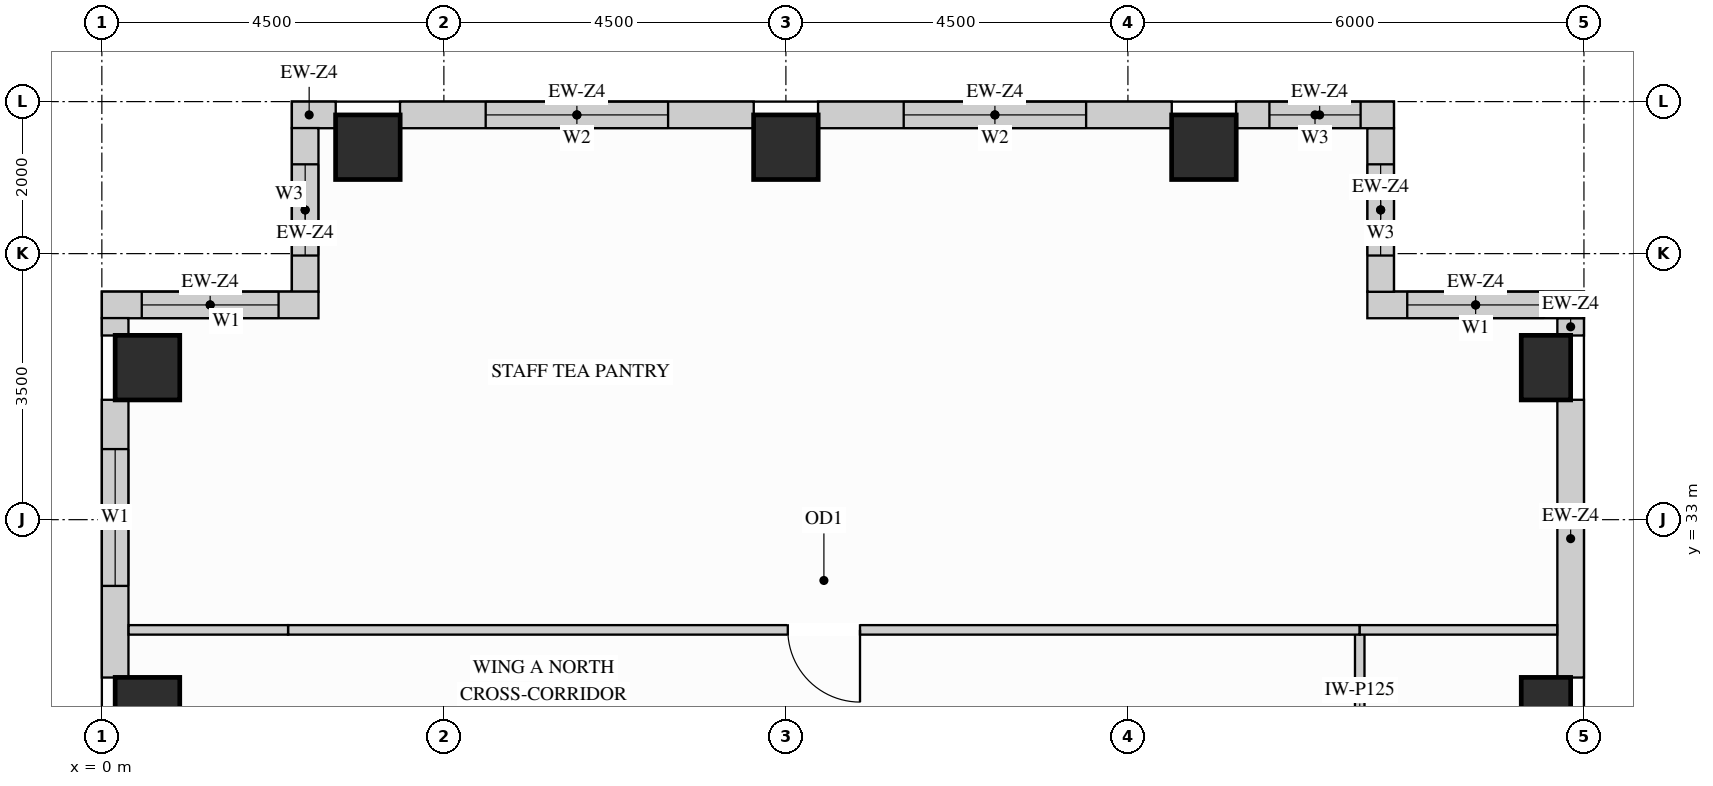
"""IFC4 building model, lengths in metres.
Left out: names, types, materials, properties, quantities, classifications, styles, units other than length and angle.
Written with IfcOpenShell. Run it as: python <this file> out.ifc"""

import sys

from ifc_helpers import new_model, si_unit, direction, frame, frame_2d, origin, origin_2d, place, context, subcontext, project, spatial, rectangle, extrude, source, transform, mapped, element, fill, save


model = new_model("IFC4")
c1 = context("Model", 3, precision=1e-05, world=origin(), true_north=direction((0.0, 1.0)))
c2 = subcontext(c1, "Body", "Model", "MODEL_VIEW")
j1 = project(units=[si_unit("LENGTHUNIT", "METRE"), si_unit("PLANEANGLEUNIT", "RADIAN")], contexts=[c1])
p1 = place(None, origin())
s1 = spatial("IfcSite", under=j1, at=p1, CompositionType="ELEMENT")
p2 = place(p1, origin())
s2 = spatial("IfcBuilding", under=s1, at=p2, CompositionType="ELEMENT")
p3 = place(p2, frame((0.0, 0.0, 234.0)))
s3 = spatial("IfcBuildingStorey", under=s2, at=p3, CompositionType="ELEMENT", Elevation=234.0)
m1 = source(origin(), c2, "Body", "SweptSolid", [
    extrude(rectangle(XDim=0.65, YDim=0.85, at=origin_2d()), origin(), (0.0, 0.0, 1.0), 3.4),
])
for number, where, z_axis, x_axis in (
    (1, (19.0, 30.5, 0.0), (0.0, 0.0, 1.0), (1.0, 0.0, 0.0)),
    (2, (19.0, 35.0, 0.0), (0.0, 0.0, 1.0), (1.0, 0.0, 0.0)),
):
    element("IfcColumn", number, at=place(p3, frame(where, z_axis=z_axis, x_axis=x_axis)), inside=s3, PredefinedType="COLUMN", context=c2, shape_type="MappedRepresentation", body=[
        mapped(m1, transform((0.0, 0.0, 0.0), x_axis=(1.0, 0.0, 0.0), y_axis=(0.0, 1.0, 0.0), z_axis=(0.0, 0.0, 1.0))),
    ])
m2 = source(origin(), c2, "Body", "SweptSolid", [
    extrude(rectangle(XDim=0.85, YDim=0.85, at=origin_2d()), origin(), (0.0, 0.0, 1.0), 3.4),
])
for number, where, z_axis, x_axis in (
    (3, (14.5, 37.9, 0.0), (0.0, 0.0, 1.0), (1.0, 0.0, 0.0)),
    (4, (3.5, 37.9, 0.0), (0.0, 0.0, 1.0), (1.0, 0.0, 0.0)),
    (5, (9.0, 37.9, 0.0), (0.0, 0.0, 1.0), (1.0, 0.0, 0.0)),
    (6, (0.6, 30.5, 0.0), (0.0, 0.0, 1.0), (1.0, 0.0, 0.0)),
    (7, (0.6, 35.0, 0.0), (0.0, 0.0, 1.0), (1.0, 0.0, 0.0)),
):
    element("IfcColumn", number, at=place(p3, frame(where, z_axis=z_axis, x_axis=x_axis)), inside=s3, PredefinedType="COLUMN", context=c2, shape_type="MappedRepresentation", body=[
        mapped(m2, transform((0.0, 0.0, 0.0), x_axis=(1.0, 0.0, 0.0), y_axis=(0.0, 1.0, 0.0), z_axis=(0.0, 0.0, 1.0))),
    ])
m3 = source(origin(), c2, "Body", "SweptSolid", [
    extrude(rectangle(XDim=3.654, YDim=0.35, at=frame_2d((1.827, 0.0))), origin(), (0.0, 0.0, 1.0), 2.619),
])
p4 = place(p3, frame((19.325, 30.923, 0.0), z_axis=(0.0, 0.0, 1.0), x_axis=(0.0, 1.0, 0.0)))
e8 = element("IfcWall", 8, at=p4, inside=s3, PredefinedType="SOLIDWALL", context=c2, shape_type="MappedRepresentation", body=[
    mapped(m3, transform((0.0, 0.0, 0.0), x_axis=(1.0, 0.0, 0.0), y_axis=(0.0, 1.0, 0.0), z_axis=(0.0, 0.0, 1.0))),
])
m4 = source(origin(), c2, "Body", "SweptSolid", [
    extrude(rectangle(XDim=0.229, YDim=0.35, at=frame_2d((0.115, 0.0))), origin(), (0.0, 0.0, 1.0), 3.385),
])
p5 = place(p3, frame((19.325, 35.423, 0.0), z_axis=(0.0, 0.0, 1.0), x_axis=(0.0, 1.0, 0.0)))
e9 = element("IfcWall", 9, at=p5, inside=s3, PredefinedType="SOLIDWALL", context=c2, shape_type="MappedRepresentation", body=[
    mapped(m4, transform((0.0, 0.0, 0.0), x_axis=(1.0, 0.0, 0.0), y_axis=(0.0, 1.0, 0.0), z_axis=(0.0, 0.0, 1.0))),
])
p6 = place(p3, frame((19.5, 35.825, 0.0), z_axis=(0.0, 0.0, 1.0), x_axis=(-1.0, 0.0, 0.0)))
e10 = element("IfcWall", 10, at=p6, inside=s3, PredefinedType="SOLIDWALL", context=c2, shape_type="SweptSolid", body=[
    extrude(rectangle(XDim=2.85, YDim=0.35, at=frame_2d((1.425, 0.0))), origin(), (0.0, 0.0, 1.0), 3.385),
])
p7 = place(p6, frame((0.525, 0.0, 0.78)))
e11 = element("IfcOpeningElement", 11, at=p7, cuts=e10, PredefinedType="OPENING", context=c2, shape_type="SweptSolid", body=[
    extrude(rectangle(XDim=1.8, YDim=2.1, at=frame_2d((0.9, 1.05))), frame((0.0, 0.185, 0.0), z_axis=(0.0, -1.0, 0.0), x_axis=(1.0, 0.0, 0.0)), (0.0, 0.0, 1.0), 0.37),
])
p8 = place(p3, frame((16.825, 35.998, 0.0), z_axis=(0.0, 0.0, 1.0), x_axis=(0.0, 1.0, 0.0)))
e12 = element("IfcWall", 12, at=p8, inside=s3, PredefinedType="SOLIDWALL", context=c2, shape_type="SweptSolid", body=[
    extrude(rectangle(XDim=2.154, YDim=0.35, at=frame_2d((1.077, 0.0))), origin(), (0.0, 0.0, 1.0), 3.385),
])
p9 = place(p8, frame((0.477, 0.0, 0.78)))
e13 = element("IfcOpeningElement", 13, at=p9, cuts=e12, PredefinedType="OPENING", context=c2, shape_type="SweptSolid", body=[
    extrude(rectangle(XDim=1.2, YDim=2.1, at=frame_2d((0.6, 1.05))), frame((0.0, 0.185, 0.0), z_axis=(0.0, -1.0, 0.0), x_axis=(1.0, 0.0, 0.0)), (0.0, 0.0, 1.0), 0.37),
])
p10 = place(p3, frame((17.0, 38.325, 0.0), z_axis=(0.0, 0.0, 1.0), x_axis=(-1.0, 0.0, 0.0)))
e14 = element("IfcWall", 14, at=p10, inside=s3, PredefinedType="SOLIDWALL", context=c2, shape_type="SweptSolid", body=[
    extrude(rectangle(XDim=2.077, YDim=0.35, at=frame_2d((1.039, 0.0))), origin(), (0.0, 0.0, 1.0), 3.385),
])
p11 = place(p10, frame((0.438, 0.0, 0.78)))
e15 = element("IfcOpeningElement", 15, at=p11, cuts=e14, PredefinedType="OPENING", context=c2, shape_type="SweptSolid", body=[
    extrude(rectangle(XDim=1.2, YDim=2.1, at=frame_2d((0.6, 1.05))), frame((0.0, 0.185, 0.0), z_axis=(0.0, -1.0, 0.0), x_axis=(1.0, 0.0, 0.0)), (0.0, 0.0, 1.0), 0.37),
])
p12 = place(p3, frame((14.077, 38.325, 0.0), z_axis=(0.0, 0.0, 1.0), x_axis=(-1.0, 0.0, 0.0)))
e16 = element("IfcWall", 16, at=p12, inside=s3, PredefinedType="SOLIDWALL", context=c2, shape_type="SweptSolid", body=[
    extrude(rectangle(XDim=4.654, YDim=0.35, at=frame_2d((2.327, 0.0))), origin(), (0.0, 0.0, 1.0), 3.385),
])
p13 = place(p12, frame((1.127, 0.0, 0.78)))
e17 = element("IfcOpeningElement", 17, at=p13, cuts=e16, PredefinedType="OPENING", context=c2, shape_type="SweptSolid", body=[
    extrude(rectangle(XDim=2.4, YDim=2.1, at=frame_2d((1.2, 1.05))), frame((0.0, 0.185, 0.0), z_axis=(0.0, -1.0, 0.0), x_axis=(1.0, 0.0, 0.0)), (0.0, 0.0, 1.0), 0.37),
])
p14 = place(p3, frame((8.577, 38.325, 0.0), z_axis=(0.0, 0.0, 1.0), x_axis=(-1.0, 0.0, 0.0)))
e18 = element("IfcWall", 18, at=p14, inside=s3, PredefinedType="SOLIDWALL", context=c2, shape_type="SweptSolid", body=[
    extrude(rectangle(XDim=4.654, YDim=0.35, at=frame_2d((2.327, 0.0))), origin(), (0.0, 0.0, 1.0), 3.385),
])
p15 = place(p14, frame((1.127, 0.0, 0.78)))
e19 = element("IfcOpeningElement", 19, at=p15, cuts=e18, PredefinedType="OPENING", context=c2, shape_type="SweptSolid", body=[
    extrude(rectangle(XDim=2.4, YDim=2.1, at=frame_2d((1.2, 1.05))), frame((0.0, 0.185, 0.0), z_axis=(0.0, -1.0, 0.0), x_axis=(1.0, 0.0, 0.0)), (0.0, 0.0, 1.0), 0.37),
])
m5 = source(origin(), c2, "Body", "SweptSolid", [
    extrude(rectangle(XDim=0.577, YDim=0.35, at=frame_2d((0.289, 0.0))), origin(), (0.0, 0.0, 1.0), 3.385),
])
p16 = place(p3, frame((3.077, 38.325, 0.0), z_axis=(0.0, 0.0, 1.0), x_axis=(-1.0, 0.0, 0.0)))
e20 = element("IfcWall", 20, at=p16, inside=s3, PredefinedType="SOLIDWALL", context=c2, shape_type="MappedRepresentation", body=[
    mapped(m5, transform((0.0, 0.0, 0.0), x_axis=(1.0, 0.0, 0.0), y_axis=(0.0, 1.0, 0.0), z_axis=(0.0, 0.0, 1.0))),
])
p17 = place(p3, frame((2.675, 38.152, 0.0), z_axis=(0.0, 0.0, 1.0), x_axis=(0.0, -1.0, 0.0)))
e21 = element("IfcWall", 21, at=p17, inside=s3, PredefinedType="SOLIDWALL", context=c2, shape_type="SweptSolid", body=[
    extrude(rectangle(XDim=2.154, YDim=0.35, at=frame_2d((1.077, 0.0))), origin(), (0.0, 0.0, 1.0), 3.385),
])
p18 = place(p17, frame((0.477, 0.0, 0.78)))
e22 = element("IfcOpeningElement", 22, at=p18, cuts=e21, PredefinedType="OPENING", context=c2, shape_type="SweptSolid", body=[
    extrude(rectangle(XDim=1.2, YDim=2.1, at=frame_2d((0.6, 1.05))), frame((0.0, 0.185, 0.0), z_axis=(0.0, -1.0, 0.0), x_axis=(1.0, 0.0, 0.0)), (0.0, 0.0, 1.0), 0.37),
])
p19 = place(p3, frame((2.85, 35.825, 0.0), z_axis=(0.0, 0.0, 1.0), x_axis=(-1.0, 0.0, 0.0)))
e23 = element("IfcWall", 23, at=p19, inside=s3, PredefinedType="SOLIDWALL", context=c2, shape_type="SweptSolid", body=[
    extrude(rectangle(XDim=2.85, YDim=0.35, at=frame_2d((1.425, 0.0))), origin(), (0.0, 0.0, 1.0), 3.385),
])
p20 = place(p19, frame((0.525, 0.0, 0.78)))
e24 = element("IfcOpeningElement", 24, at=p20, cuts=e23, PredefinedType="OPENING", context=c2, shape_type="SweptSolid", body=[
    extrude(rectangle(XDim=1.8, YDim=2.1, at=frame_2d((0.9, 1.05))), frame((0.0, 0.185, 0.0), z_axis=(0.0, -1.0, 0.0), x_axis=(1.0, 0.0, 0.0)), (0.0, 0.0, 1.0), 0.37),
])
p21 = place(p3, frame((0.175, 35.652, 0.0), z_axis=(0.0, 0.0, 1.0), x_axis=(0.0, -1.0, 0.0)))
e25 = element("IfcWall", 25, at=p21, inside=s3, PredefinedType="SOLIDWALL", context=c2, shape_type="MappedRepresentation", body=[
    mapped(m4, transform((0.0, 0.0, 0.0), x_axis=(1.0, 0.0, 0.0), y_axis=(0.0, 1.0, 0.0), z_axis=(0.0, 0.0, 1.0))),
])
p22 = place(p3, frame((0.175, 34.577, 0.0), z_axis=(0.0, 0.0, 1.0), x_axis=(0.0, -1.0, 0.0)))
e26 = element("IfcWall", 26, at=p22, inside=s3, PredefinedType="SOLIDWALL", context=c2, shape_type="SweptSolid", body=[
    extrude(rectangle(XDim=3.654, YDim=0.35, at=frame_2d((1.827, 0.0))), origin(), (0.0, 0.0, 1.0), 3.385),
])
p23 = place(p22, frame((0.648, 0.0, 0.78)))
e27 = element("IfcOpeningElement", 27, at=p23, cuts=e26, PredefinedType="OPENING", context=c2, shape_type="SweptSolid", body=[
    extrude(rectangle(XDim=1.8, YDim=2.1, at=frame_2d((0.9, 1.05))), frame((0.0, 0.185, 0.0), z_axis=(0.0, -1.0, 0.0), x_axis=(1.0, 0.0, 0.0)), (0.0, 0.0, 1.0), 0.37),
])
p24 = place(p3, frame((16.55, 26.05, 0.0), z_axis=(0.0, 0.0, 1.0), x_axis=(0.0, 1.0, 0.0)))
e28 = element("IfcWall", 28, at=p24, inside=s3, PredefinedType="PARTITIONING", context=c2, shape_type="SweptSolid", body=[
    extrude(rectangle(XDim=5.5, YDim=0.125, at=frame_2d((2.75, 0.0))), origin(), (0.0, 0.0, 1.0), 3.385),
])
p25 = place(p24, frame((2.275, 0.0, 0.0)))
e29 = element("IfcOpeningElement", 29, at=p25, cuts=e28, PredefinedType="OPENING", context=c2, shape_type="SweptSolid", body=[
    extrude(rectangle(XDim=0.95, YDim=2.15, at=frame_2d((0.475, 1.075))), frame((0.0, 0.073, 0.0), z_axis=(0.0, -1.0, 0.0), x_axis=(1.0, 0.0, 0.0)), (0.0, 0.0, 1.0), 0.145),
])
p26 = place(p3, frame((2.45, 31.55, 0.0), z_axis=(0.0, 0.0, 1.0), x_axis=(1.0, 0.0, 0.0)))
e30 = element("IfcWall", 30, at=p26, inside=s3, PredefinedType="PARTITIONING", context=c2, shape_type="SweptSolid", body=[
    extrude(rectangle(XDim=14.1, YDim=0.125, at=frame_2d((7.05, 0.0))), origin(), (0.0, 0.0, 1.0), 3.385),
])
p27 = place(p26, frame((6.575, 0.0, 0.0)))
e31 = element("IfcOpeningElement", 31, at=p27, cuts=e30, PredefinedType="OPENING", context=c2, shape_type="SweptSolid", body=[
    extrude(rectangle(XDim=0.95, YDim=2.15, at=frame_2d((0.475, 1.075))), frame((0.0, 0.073, 0.0), z_axis=(0.0, -1.0, 0.0), x_axis=(1.0, 0.0, 0.0)), (0.0, 0.0, 1.0), 0.145),
])
m6 = source(origin(), c2, "Body", "SweptSolid", [
    extrude(rectangle(XDim=2.598, YDim=0.125, at=frame_2d((1.299, 0.0))), origin(), (0.0, 0.0, 1.0), 3.385),
])
p28 = place(p3, frame((16.55, 31.55, 0.0), z_axis=(0.0, 0.0, 1.0), x_axis=(1.0, 0.0, 0.0)))
e32 = element("IfcWall", 32, at=p28, inside=s3, PredefinedType="PARTITIONING", context=c2, shape_type="MappedRepresentation", body=[
    mapped(m6, transform((0.0, 0.0, 0.0), x_axis=(1.0, 0.0, 0.0), y_axis=(0.0, 1.0, 0.0), z_axis=(0.0, 0.0, 1.0))),
])
m7 = source(origin(), c2, "Body", "SweptSolid", [
    extrude(rectangle(XDim=2.098, YDim=0.125, at=frame_2d((1.049, 0.0))), origin(), (0.0, 0.0, 1.0), 3.385),
])
p29 = place(p3, frame((0.352, 31.55, 0.0), z_axis=(0.0, 0.0, 1.0), x_axis=(1.0, 0.0, 0.0)))
e33 = element("IfcWall", 33, at=p29, inside=s3, PredefinedType="PARTITIONING", context=c2, shape_type="MappedRepresentation", body=[
    mapped(m7, transform((0.0, 0.0, 0.0), x_axis=(1.0, 0.0, 0.0), y_axis=(0.0, 1.0, 0.0), z_axis=(0.0, 0.0, 1.0))),
])
m8 = source(origin(), c2, "Body", "SweptSolid", [
    extrude(rectangle(XDim=0.95, YDim=2.15, at=frame_2d((0.475, 1.075))), frame((0.0, 0.025, 0.0), z_axis=(0.0, -1.0, 0.0), x_axis=(1.0, 0.0, 0.0)), (0.0, 0.0, 1.0), 0.05),
])
p30 = place(p27, origin())
e34 = element("IfcDoor", 34, at=p30, inside=s3, OperationType="SINGLE_SWING_RIGHT", PredefinedType="DOOR", context=c2, shape_type="MappedRepresentation", body=[
    mapped(m8, transform((0.0, 0.0, 0.0), x_axis=(1.0, 0.0, 0.0), y_axis=(0.0, 1.0, 0.0), z_axis=(0.0, 0.0, 1.0))),
])
fill(e31, e34)
m9 = source(origin(), c2, "Body", "SweptSolid", [
    extrude(rectangle(XDim=1.8, YDim=2.1, at=frame_2d((0.9, 1.05))), frame((0.0, 0.03, 0.0), z_axis=(0.0, -1.0, 0.0), x_axis=(1.0, 0.0, 0.0)), (0.0, 0.0, 1.0), 0.06),
])
p31 = place(p7, origin())
e35 = element("IfcWindow", 35, at=p31, inside=s3, PartitioningType="SINGLE_PANEL", PredefinedType="WINDOW", context=c2, shape_type="MappedRepresentation", body=[
    mapped(m9, transform((0.0, 0.0, 0.0), x_axis=(1.0, 0.0, 0.0), y_axis=(0.0, 1.0, 0.0), z_axis=(0.0, 0.0, 1.0))),
])
fill(e11, e35)
p32 = place(p20, origin())
e36 = element("IfcWindow", 36, at=p32, inside=s3, PartitioningType="SINGLE_PANEL", PredefinedType="WINDOW", context=c2, shape_type="MappedRepresentation", body=[
    mapped(m9, transform((0.0, 0.0, 0.0), x_axis=(1.0, 0.0, 0.0), y_axis=(0.0, 1.0, 0.0), z_axis=(0.0, 0.0, 1.0))),
])
fill(e24, e36)
p33 = place(p23, origin())
e37 = element("IfcWindow", 37, at=p33, inside=s3, PartitioningType="SINGLE_PANEL", PredefinedType="WINDOW", context=c2, shape_type="MappedRepresentation", body=[
    mapped(m9, transform((0.0, 0.0, 0.0), x_axis=(1.0, 0.0, 0.0), y_axis=(0.0, 1.0, 0.0), z_axis=(0.0, 0.0, 1.0))),
])
fill(e27, e37)
m10 = source(origin(), c2, "Body", "SweptSolid", [
    extrude(rectangle(XDim=2.4, YDim=2.1, at=frame_2d((1.2, 1.05))), frame((0.0, 0.03, 0.0), z_axis=(0.0, -1.0, 0.0), x_axis=(1.0, 0.0, 0.0)), (0.0, 0.0, 1.0), 0.06),
])
p34 = place(p13, origin())
e38 = element("IfcWindow", 38, at=p34, inside=s3, PartitioningType="SINGLE_PANEL", PredefinedType="WINDOW", context=c2, shape_type="MappedRepresentation", body=[
    mapped(m10, transform((0.0, 0.0, 0.0), x_axis=(1.0, 0.0, 0.0), y_axis=(0.0, 1.0, 0.0), z_axis=(0.0, 0.0, 1.0))),
])
fill(e17, e38)
p35 = place(p15, origin())
e39 = element("IfcWindow", 39, at=p35, inside=s3, PartitioningType="SINGLE_PANEL", PredefinedType="WINDOW", context=c2, shape_type="MappedRepresentation", body=[
    mapped(m10, transform((0.0, 0.0, 0.0), x_axis=(1.0, 0.0, 0.0), y_axis=(0.0, 1.0, 0.0), z_axis=(0.0, 0.0, 1.0))),
])
fill(e19, e39)
m11 = source(origin(), c2, "Body", "SweptSolid", [
    extrude(rectangle(XDim=1.2, YDim=2.1, at=frame_2d((0.6, 1.05))), frame((0.0, 0.03, 0.0), z_axis=(0.0, -1.0, 0.0), x_axis=(1.0, 0.0, 0.0)), (0.0, 0.0, 1.0), 0.06),
])
p36 = place(p9, origin())
e40 = element("IfcWindow", 40, at=p36, inside=s3, PartitioningType="SINGLE_PANEL", PredefinedType="WINDOW", context=c2, shape_type="MappedRepresentation", body=[
    mapped(m11, transform((0.0, 0.0, 0.0), x_axis=(1.0, 0.0, 0.0), y_axis=(0.0, 1.0, 0.0), z_axis=(0.0, 0.0, 1.0))),
])
fill(e13, e40)
p37 = place(p11, origin())
e41 = element("IfcWindow", 41, at=p37, inside=s3, PartitioningType="SINGLE_PANEL", PredefinedType="WINDOW", context=c2, shape_type="MappedRepresentation", body=[
    mapped(m11, transform((0.0, 0.0, 0.0), x_axis=(1.0, 0.0, 0.0), y_axis=(0.0, 1.0, 0.0), z_axis=(0.0, 0.0, 1.0))),
])
fill(e15, e41)
p38 = place(p18, origin())
e42 = element("IfcWindow", 42, at=p38, inside=s3, PartitioningType="SINGLE_PANEL", PredefinedType="WINDOW", context=c2, shape_type="MappedRepresentation", body=[
    mapped(m11, transform((0.0, 0.0, 0.0), x_axis=(1.0, 0.0, 0.0), y_axis=(0.0, 1.0, 0.0), z_axis=(0.0, 0.0, 1.0))),
])
fill(e22, e42)
save(model, sys.argv[1])
